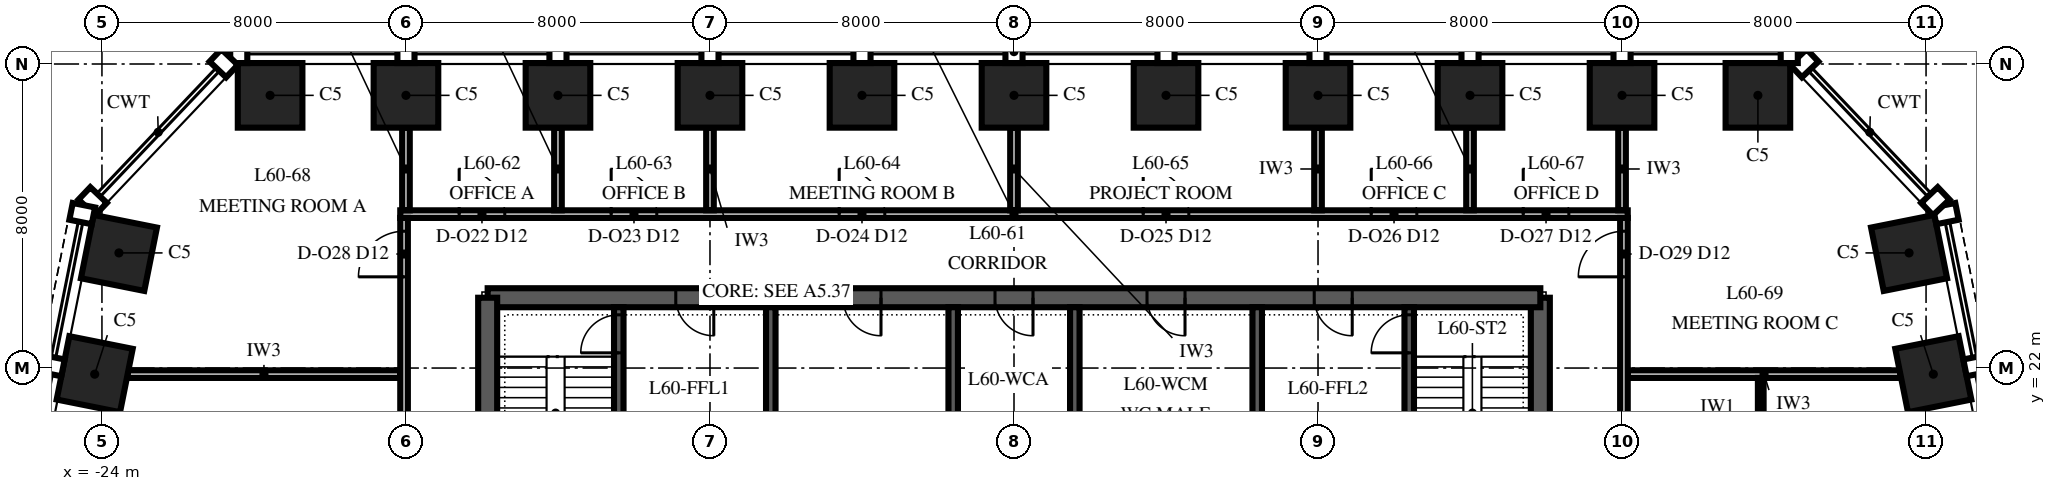
"""IFC4 building model, lengths in metres.
Left out: names, types, materials, properties, quantities, classifications, styles, units other than length and angle.
Written with IfcOpenShell. Run it as: python <this file> out.ifc"""

import sys

from ifc_helpers import new_model, si_unit, direction, frame, frame_2d, origin, origin_2d, place, context, subcontext, project, spatial, polyline, rectangle, outline, extrude, element, fill, save


model = new_model("IFC4")
c1 = context("Model", 3, precision=1e-05, world=origin(), true_north=direction((0.0, 1.0)))
c2 = subcontext(c1, "Body", "Model", "MODEL_VIEW")
j1 = project(units=[si_unit("LENGTHUNIT", "METRE"), si_unit("PLANEANGLEUNIT", "RADIAN")], contexts=[c1])
p1 = place(None, origin())
s1 = spatial("IfcSite", under=j1, at=p1, CompositionType="ELEMENT")
p2 = place(p1, origin())
s2 = spatial("IfcBuilding", under=s1, at=p2, CompositionType="ELEMENT")
p3 = place(p2, frame((0.0, 0.0, 260.0)))
s3 = spatial("IfcBuildingStorey", under=s2, at=p3, CompositionType="ELEMENT", Elevation=260.0)
for number, where, z_axis, x_axis in (
    (1, (24.191, 21.838, 0.0), (0.0, 0.0, 1.0), (-0.196, 0.981, 0.0)),
    (2, (23.553, 25.029, 0.0), (0.0, 0.0, 1.0), (-0.196, 0.981, 0.0)),
    (3, (19.575, 29.175, 0.0), (0.0, 0.0, 1.0), (-1.0, 0.0, 0.0)),
    (4, (16.0, 29.175, 0.0), (0.0, 0.0, 1.0), (-1.0, 0.0, 0.0)),
    (5, (12.0, 29.175, 0.0), (0.0, 0.0, 1.0), (-1.0, 0.0, 0.0)),
    (6, (8.0, 29.175, 0.0), (0.0, 0.0, 1.0), (-1.0, 0.0, 0.0)),
    (7, (4.0, 29.175, 0.0), (0.0, 0.0, 1.0), (-1.0, 0.0, 0.0)),
    (8, (0.0, 29.175, 0.0), (0.0, 0.0, 1.0), (-1.0, 0.0, 0.0)),
    (9, (-4.0, 29.175, 0.0), (0.0, 0.0, 1.0), (-1.0, 0.0, 0.0)),
    (10, (-8.0, 29.175, 0.0), (0.0, 0.0, 1.0), (-1.0, 0.0, 0.0)),
    (11, (-12.0, 29.175, 0.0), (0.0, 0.0, 1.0), (-1.0, 0.0, 0.0)),
    (12, (-16.0, 29.175, 0.0), (0.0, 0.0, 1.0), (-1.0, 0.0, 0.0)),
    (13, (-19.575, 29.175, 0.0), (0.0, 0.0, 1.0), (-1.0, 0.0, 0.0)),
    (14, (-23.553, 25.029, 0.0), (0.0, 0.0, 1.0), (-0.196, -0.981, 0.0)),
    (15, (-24.191, 21.838, 0.0), (0.0, 0.0, 1.0), (-0.196, -0.981, 0.0)),
):
    element("IfcColumn", number, at=place(p3, frame(where, z_axis=z_axis, x_axis=x_axis)), inside=s3, PredefinedType="COLUMN", context=c2, shape_type="SweptSolid", body=[
        extrude(rectangle(XDim=1.7, YDim=1.7, at=origin_2d()), origin(), (0.0, 0.0, 1.0), 4.0),
    ])
p4 = place(p3, frame((13.85, 6.15, 0.0), z_axis=(0.0, 0.0, 1.0), x_axis=(0.0, 1.0, 0.0)))
e16 = element("IfcWall", 16, at=p4, inside=s3, PredefinedType="SHEAR", context=c2, shape_type="SweptSolid", body=[
    extrude(outline(polyline([(0.0, -0.25), (17.7, -0.25), (17.7, 0.0), (17.45, 0.0), (17.45, 0.25), (0.25, 0.25), (0.25, 0.0), (0.0, 0.0), (0.0, -0.25)])), origin(), (0.0, 0.0, 1.0), 4.0),
])
p5 = place(p4, frame((4.15, 0.0, 0.0)))
e17 = element("IfcOpeningElement", 17, at=p5, cuts=e16, PredefinedType="OPENING", context=c2, shape_type="SweptSolid", body=[
    extrude(rectangle(XDim=1.8, YDim=2.4, at=frame_2d((0.9, 1.2))), frame((0.0, 0.265, 0.0), z_axis=(0.0, -1.0, 0.0), x_axis=(1.0, 0.0, 0.0)), (0.0, 0.0, 1.0), 0.53),
])
p6 = place(p3, frame((13.85, 23.85, 0.0), z_axis=(0.0, 0.0, 1.0), x_axis=(-1.0, 0.0, 0.0)))
e18 = element("IfcWall", 18, at=p6, inside=s3, PredefinedType="SHEAR", context=c2, shape_type="SweptSolid", body=[
    extrude(rectangle(XDim=27.7, YDim=0.5, at=frame_2d((13.85, 0.0))), origin(), (0.0, 0.0, 1.0), 4.0),
])
p7 = place(p6, frame((21.75, 0.0, 0.0)))
e19 = element("IfcOpeningElement", 19, at=p7, cuts=e18, PredefinedType="OPENING", context=c2, shape_type="SweptSolid", body=[
    extrude(rectangle(XDim=1.0, YDim=2.1, at=frame_2d((0.5, 1.05))), frame((0.0, 0.265, 0.0), z_axis=(0.0, -1.0, 0.0), x_axis=(1.0, 0.0, 0.0)), (0.0, 0.0, 1.0), 0.53),
])
p8 = place(p6, frame((4.95, 0.0, 0.0)))
e20 = element("IfcOpeningElement", 20, at=p8, cuts=e18, PredefinedType="OPENING", context=c2, shape_type="SweptSolid", body=[
    extrude(rectangle(XDim=1.0, YDim=2.1, at=frame_2d((0.5, 1.05))), frame((0.0, 0.265, 0.0), z_axis=(0.0, -1.0, 0.0), x_axis=(1.0, 0.0, 0.0)), (0.0, 0.0, 1.0), 0.53),
])
p9 = place(p6, frame((17.35, 0.0, 0.0)))
e21 = element("IfcOpeningElement", 21, at=p9, cuts=e18, PredefinedType="OPENING", context=c2, shape_type="SweptSolid", body=[
    extrude(rectangle(XDim=1.0, YDim=2.1, at=frame_2d((0.5, 1.05))), frame((0.0, 0.265, 0.0), z_axis=(0.0, -1.0, 0.0), x_axis=(1.0, 0.0, 0.0)), (0.0, 0.0, 1.0), 0.53),
])
p10 = place(p6, frame((13.35, 0.0, 0.0)))
e22 = element("IfcOpeningElement", 22, at=p10, cuts=e18, PredefinedType="OPENING", context=c2, shape_type="SweptSolid", body=[
    extrude(rectangle(XDim=1.0, YDim=2.1, at=frame_2d((0.5, 1.05))), frame((0.0, 0.265, 0.0), z_axis=(0.0, -1.0, 0.0), x_axis=(1.0, 0.0, 0.0)), (0.0, 0.0, 1.0), 0.53),
])
p11 = place(p6, frame((9.35, 0.0, 0.0)))
e23 = element("IfcOpeningElement", 23, at=p11, cuts=e18, PredefinedType="OPENING", context=c2, shape_type="SweptSolid", body=[
    extrude(rectangle(XDim=1.0, YDim=2.1, at=frame_2d((0.5, 1.05))), frame((0.0, 0.265, 0.0), z_axis=(0.0, -1.0, 0.0), x_axis=(1.0, 0.0, 0.0)), (0.0, 0.0, 1.0), 0.53),
])
p12 = place(p3, frame((-13.85, 23.85, 0.0), z_axis=(0.0, 0.0, 1.0), x_axis=(0.0, -1.0, 0.0)))
e24 = element("IfcWall", 24, at=p12, inside=s3, PredefinedType="SHEAR", context=c2, shape_type="SweptSolid", body=[
    extrude(outline(polyline([(0.0, -0.25), (17.7, -0.25), (17.7, 0.0), (17.45, 0.0), (17.45, 0.25), (0.25, 0.25), (0.25, 0.0), (0.0, 0.0), (0.0, -0.25)])), origin(), (0.0, 0.0, 1.0), 4.0),
])
p13 = place(p12, frame((11.75, 0.0, 0.0)))
e25 = element("IfcOpeningElement", 25, at=p13, cuts=e24, PredefinedType="OPENING", context=c2, shape_type="SweptSolid", body=[
    extrude(rectangle(XDim=1.8, YDim=2.4, at=frame_2d((0.9, 1.2))), frame((0.0, 0.265, 0.0), z_axis=(0.0, -1.0, 0.0), x_axis=(1.0, 0.0, 0.0)), (0.0, 0.0, 1.0), 0.53),
])
p14 = place(p3, frame((-10.4, 16.125, 0.0), z_axis=(0.0, 0.0, 1.0), x_axis=(0.0, 1.0, 0.0)))
e26 = element("IfcWall", 26, at=p14, inside=s3, PredefinedType="SHEAR", context=c2, shape_type="SweptSolid", body=[
    extrude(rectangle(XDim=7.475, YDim=0.25, at=frame_2d((3.738, 0.0))), origin(), (0.0, 0.0, 1.0), 4.0),
])
p15 = place(p14, frame((6.275, 0.0, 0.0)))
e27 = element("IfcOpeningElement", 27, at=p15, cuts=e26, PredefinedType="OPENING", context=c2, shape_type="SweptSolid", body=[
    extrude(rectangle(XDim=1.0, YDim=2.1, at=frame_2d((0.5, 1.05))), frame((0.0, 0.14, 0.0), z_axis=(0.0, -1.0, 0.0), x_axis=(1.0, 0.0, 0.0)), (0.0, 0.0, 1.0), 0.28),
])
for number, where, z_axis, x_axis in (
    (28, (-6.4, 16.125, 0.0), (0.0, 0.0, 1.0), (0.0, 1.0, 0.0)),
    (29, (-1.6, 16.125, 0.0), (0.0, 0.0, 1.0), (0.0, 1.0, 0.0)),
    (30, (1.6, 16.125, 0.0), (0.0, 0.0, 1.0), (0.0, 1.0, 0.0)),
    (31, (6.4, 16.125, 0.0), (0.0, 0.0, 1.0), (0.0, 1.0, 0.0)),
):
    element("IfcWall", number, at=place(p3, frame(where, z_axis=z_axis, x_axis=x_axis)), inside=s3, PredefinedType="SHEAR", context=c2, shape_type="SweptSolid", body=[
        extrude(rectangle(XDim=7.475, YDim=0.25, at=frame_2d((3.738, 0.0))), origin(), (0.0, 0.0, 1.0), 4.0),
    ])
p16 = place(p3, frame((10.4, 16.125, 0.0), z_axis=(0.0, 0.0, 1.0), x_axis=(0.0, 1.0, 0.0)))
e32 = element("IfcWall", 32, at=p16, inside=s3, PredefinedType="SHEAR", context=c2, shape_type="SweptSolid", body=[
    extrude(rectangle(XDim=7.475, YDim=0.25, at=frame_2d((3.738, 0.0))), origin(), (0.0, 0.0, 1.0), 4.0),
])
p17 = place(p16, frame((6.275, 0.0, 0.0)))
e33 = element("IfcOpeningElement", 33, at=p17, cuts=e32, PredefinedType="OPENING", context=c2, shape_type="SweptSolid", body=[
    extrude(rectangle(XDim=1.0, YDim=2.1, at=frame_2d((0.5, 1.05))), frame((0.0, 0.14, 0.0), z_axis=(0.0, -1.0, 0.0), x_axis=(1.0, 0.0, 0.0)), (0.0, 0.0, 1.0), 0.28),
])
for number, where, z_axis, x_axis in (
    (34, (-23.324, 21.84, 0.0), (0.0, 0.0, 1.0), (1.0, 0.0, 0.0)),
    (35, (16.15, 21.84, 0.0), (0.0, 0.0, 1.0), (1.0, 0.0, 0.0)),
):
    element("IfcWall", number, at=place(p3, frame(where, z_axis=z_axis, x_axis=x_axis)), inside=s3, PredefinedType="PARTITIONING", context=c2, shape_type="SweptSolid", body=[
        extrude(rectangle(XDim=7.174, YDim=0.2, at=frame_2d((3.587, 0.0))), origin(), (0.0, 0.0, 1.0), 3.23),
    ])
p18 = place(p3, frame((-16.15, 26.05, 0.0), z_axis=(0.0, 0.0, 1.0), x_axis=(1.0, 0.0, 0.0)))
e36 = element("IfcWall", 36, at=p18, inside=s3, PredefinedType="PARTITIONING", context=c2, shape_type="SweptSolid", body=[
    extrude(rectangle(XDim=32.3, YDim=0.2, at=frame_2d((16.15, 0.0))), origin(), (0.0, 0.0, 1.0), 3.418),
])
p19 = place(p18, frame((1.55, 0.0, 0.0)))
e37 = element("IfcOpeningElement", 37, at=p19, cuts=e36, PredefinedType="OPENING", context=c2, shape_type="SweptSolid", body=[
    extrude(rectangle(XDim=1.2, YDim=2.4, at=frame_2d((0.6, 1.2))), frame((0.0, 0.115, 0.0), z_axis=(0.0, -1.0, 0.0), x_axis=(1.0, 0.0, 0.0)), (0.0, 0.0, 1.0), 0.23),
])
p20 = place(p18, frame((5.55, 0.0, 0.0)))
e38 = element("IfcOpeningElement", 38, at=p20, cuts=e36, PredefinedType="OPENING", context=c2, shape_type="SweptSolid", body=[
    extrude(rectangle(XDim=1.2, YDim=2.4, at=frame_2d((0.6, 1.2))), frame((0.0, 0.115, 0.0), z_axis=(0.0, -1.0, 0.0), x_axis=(1.0, 0.0, 0.0)), (0.0, 0.0, 1.0), 0.23),
])
p21 = place(p18, frame((11.55, 0.0, 0.0)))
e39 = element("IfcOpeningElement", 39, at=p21, cuts=e36, PredefinedType="OPENING", context=c2, shape_type="SweptSolid", body=[
    extrude(rectangle(XDim=1.2, YDim=2.4, at=frame_2d((0.6, 1.2))), frame((0.0, 0.115, 0.0), z_axis=(0.0, -1.0, 0.0), x_axis=(1.0, 0.0, 0.0)), (0.0, 0.0, 1.0), 0.23),
])
p22 = place(p18, frame((19.55, 0.0, 0.0)))
e40 = element("IfcOpeningElement", 40, at=p22, cuts=e36, PredefinedType="OPENING", context=c2, shape_type="SweptSolid", body=[
    extrude(rectangle(XDim=1.2, YDim=2.4, at=frame_2d((0.6, 1.2))), frame((0.0, 0.115, 0.0), z_axis=(0.0, -1.0, 0.0), x_axis=(1.0, 0.0, 0.0)), (0.0, 0.0, 1.0), 0.23),
])
p23 = place(p18, frame((25.55, 0.0, 0.0)))
e41 = element("IfcOpeningElement", 41, at=p23, cuts=e36, PredefinedType="OPENING", context=c2, shape_type="SweptSolid", body=[
    extrude(rectangle(XDim=1.2, YDim=2.4, at=frame_2d((0.6, 1.2))), frame((0.0, 0.115, 0.0), z_axis=(0.0, -1.0, 0.0), x_axis=(1.0, 0.0, 0.0)), (0.0, 0.0, 1.0), 0.23),
])
p24 = place(p18, frame((29.55, 0.0, 0.0)))
e42 = element("IfcOpeningElement", 42, at=p24, cuts=e36, PredefinedType="OPENING", context=c2, shape_type="SweptSolid", body=[
    extrude(rectangle(XDim=1.2, YDim=2.4, at=frame_2d((0.6, 1.2))), frame((0.0, 0.115, 0.0), z_axis=(0.0, -1.0, 0.0), x_axis=(1.0, 0.0, 0.0)), (0.0, 0.0, 1.0), 0.23),
])
p25 = place(p3, frame((-16.05, 1.94, 0.0), z_axis=(0.0, 0.0, 1.0), x_axis=(0.0, 1.0, 0.0)))
e43 = element("IfcWall", 43, at=p25, inside=s3, PredefinedType="PARTITIONING", context=c2, shape_type="SweptSolid", body=[
    extrude(rectangle(XDim=24.01, YDim=0.2, at=frame_2d((12.005, 0.0))), origin(), (0.0, 0.0, 1.0), 2.842),
])
p26 = place(p25, frame((8.46, 0.0, 0.0)))
e44 = element("IfcOpeningElement", 44, at=p26, cuts=e43, PredefinedType="OPENING", context=c2, shape_type="SweptSolid", body=[
    extrude(rectangle(XDim=1.2, YDim=2.4, at=frame_2d((0.6, 1.2))), frame((0.0, 0.115, 0.0), z_axis=(0.0, -1.0, 0.0), x_axis=(1.0, 0.0, 0.0)), (0.0, 0.0, 1.0), 0.23),
])
p27 = place(p25, frame((22.46, 0.0, 0.0)))
e45 = element("IfcOpeningElement", 45, at=p27, cuts=e43, PredefinedType="OPENING", context=c2, shape_type="SweptSolid", body=[
    extrude(rectangle(XDim=1.2, YDim=2.4, at=frame_2d((0.6, 1.2))), frame((0.0, 0.115, 0.0), z_axis=(0.0, -1.0, 0.0), x_axis=(1.0, 0.0, 0.0)), (0.0, 0.0, 1.0), 0.23),
])
for number, where, z_axis, x_axis in (
    (46, (-16.0, 26.15, 0.0), (0.0, 0.0, 1.0), (0.0, 1.0, 0.0)),
    (47, (-12.0, 26.15, 0.0), (0.0, 0.0, 1.0), (0.0, 1.0, 0.0)),
    (48, (-8.0, 26.15, 0.0), (0.0, 0.0, 1.0), (0.0, 1.0, 0.0)),
    (49, (0.0, 26.15, 0.0), (0.0, 0.0, 1.0), (0.0, 1.0, 0.0)),
    (50, (8.0, 26.15, 0.0), (0.0, 0.0, 1.0), (0.0, 1.0, 0.0)),
    (51, (12.0, 26.15, 0.0), (0.0, 0.0, 1.0), (0.0, 1.0, 0.0)),
    (52, (16.0, 26.15, 0.0), (0.0, 0.0, 1.0), (0.0, 1.0, 0.0)),
):
    element("IfcWall", number, at=place(p3, frame(where, z_axis=z_axis, x_axis=x_axis)), inside=s3, PredefinedType="PARTITIONING", context=c2, shape_type="SweptSolid", body=[
        extrude(rectangle(XDim=2.175, YDim=0.2, at=frame_2d((1.087, 0.0))), origin(), (0.0, 0.0, 1.0), 3.418),
    ])
p28 = place(p3, frame((16.05, 1.94, 0.0), z_axis=(0.0, 0.0, 1.0), x_axis=(0.0, 1.0, 0.0)))
e53 = element("IfcWall", 53, at=p28, inside=s3, PredefinedType="PARTITIONING", context=c2, shape_type="SweptSolid", body=[
    extrude(rectangle(XDim=24.01, YDim=0.2, at=frame_2d((12.005, 0.0))), origin(), (0.0, 0.0, 1.0), 2.842),
])
p29 = place(p28, frame((8.46, 0.0, 0.0)))
e54 = element("IfcOpeningElement", 54, at=p29, cuts=e53, PredefinedType="OPENING", context=c2, shape_type="SweptSolid", body=[
    extrude(rectangle(XDim=1.2, YDim=2.4, at=frame_2d((0.6, 1.2))), frame((0.0, 0.115, 0.0), z_axis=(0.0, -1.0, 0.0), x_axis=(1.0, 0.0, 0.0)), (0.0, 0.0, 1.0), 0.23),
])
p30 = place(p28, frame((22.46, 0.0, 0.0)))
e55 = element("IfcOpeningElement", 55, at=p30, cuts=e53, PredefinedType="OPENING", context=c2, shape_type="SweptSolid", body=[
    extrude(rectangle(XDim=1.2, YDim=2.4, at=frame_2d((0.6, 1.2))), frame((0.0, 0.115, 0.0), z_axis=(0.0, -1.0, 0.0), x_axis=(1.0, 0.0, 0.0)), (0.0, 0.0, 1.0), 0.23),
])
p31 = place(p3, frame((19.65, 17.915, 0.0), z_axis=(0.0, 0.0, 1.0), x_axis=(0.0, 1.0, 0.0)))
e56 = element("IfcWall", 56, at=p31, inside=s3, PredefinedType="PARTITIONING", context=c2, shape_type="SweptSolid", body=[
    extrude(rectangle(XDim=3.825, YDim=0.15, at=frame_2d((1.913, 0.0))), origin(), (0.0, 0.0, 1.0), 3.23),
])
p32 = place(p31, frame((1.425, 0.0, 0.0)))
e57 = element("IfcOpeningElement", 57, at=p32, cuts=e56, PredefinedType="OPENING", context=c2, shape_type="SweptSolid", body=[
    extrude(rectangle(XDim=1.0, YDim=2.3, at=frame_2d((0.5, 1.15))), frame((0.0, 0.09, 0.0), z_axis=(0.0, -1.0, 0.0), x_axis=(1.0, 0.0, 0.0)), (0.0, 0.0, 1.0), 0.18),
])
p33 = place(p7, origin())
e58 = element("IfcDoor", 58, at=p33, inside=s3, OperationType="SINGLE_SWING_RIGHT", PredefinedType="DOOR", context=c2, shape_type="SweptSolid", body=[
    extrude(rectangle(XDim=1.0, YDim=2.1, at=frame_2d((0.5, 1.05))), frame((0.0, 0.25, 0.0), z_axis=(0.0, -1.0, 0.0), x_axis=(1.0, 0.0, 0.0)), (0.0, 0.0, 1.0), 0.5),
])
fill(e19, e58)
p34 = place(p8, origin())
e59 = element("IfcDoor", 59, at=p34, inside=s3, OperationType="SINGLE_SWING_RIGHT", PredefinedType="DOOR", context=c2, shape_type="SweptSolid", body=[
    extrude(rectangle(XDim=1.0, YDim=2.1, at=frame_2d((0.5, 1.05))), frame((0.0, 0.25, 0.0), z_axis=(0.0, -1.0, 0.0), x_axis=(1.0, 0.0, 0.0)), (0.0, 0.0, 1.0), 0.5),
])
fill(e20, e59)
p35 = place(p9, origin())
e60 = element("IfcDoor", 60, at=p35, inside=s3, OperationType="SINGLE_SWING_LEFT", PredefinedType="DOOR", context=c2, shape_type="SweptSolid", body=[
    extrude(rectangle(XDim=1.0, YDim=2.1, at=frame_2d((0.5, 1.05))), frame((0.0, 0.25, 0.0), z_axis=(0.0, -1.0, 0.0), x_axis=(1.0, 0.0, 0.0)), (0.0, 0.0, 1.0), 0.5),
])
fill(e21, e60)
p36 = place(p10, origin())
e61 = element("IfcDoor", 61, at=p36, inside=s3, OperationType="SINGLE_SWING_LEFT", PredefinedType="DOOR", context=c2, shape_type="SweptSolid", body=[
    extrude(rectangle(XDim=1.0, YDim=2.1, at=frame_2d((0.5, 1.05))), frame((0.0, 0.25, 0.0), z_axis=(0.0, -1.0, 0.0), x_axis=(1.0, 0.0, 0.0)), (0.0, 0.0, 1.0), 0.5),
])
fill(e22, e61)
p37 = place(p11, origin())
e62 = element("IfcDoor", 62, at=p37, inside=s3, OperationType="SINGLE_SWING_LEFT", PredefinedType="DOOR", context=c2, shape_type="SweptSolid", body=[
    extrude(rectangle(XDim=1.0, YDim=2.1, at=frame_2d((0.5, 1.05))), frame((0.0, 0.25, 0.0), z_axis=(0.0, -1.0, 0.0), x_axis=(1.0, 0.0, 0.0)), (0.0, 0.0, 1.0), 0.5),
])
fill(e23, e62)
p38 = place(p15, origin())
e63 = element("IfcDoor", 63, at=p38, inside=s3, OperationType="SINGLE_SWING_LEFT", PredefinedType="DOOR", context=c2, shape_type="SweptSolid", body=[
    extrude(rectangle(XDim=1.0, YDim=2.1, at=frame_2d((0.5, 1.05))), frame((0.0, 0.125, 0.0), z_axis=(0.0, -1.0, 0.0), x_axis=(1.0, 0.0, 0.0)), (0.0, 0.0, 1.0), 0.25),
])
fill(e27, e63)
p39 = place(p17, origin())
e64 = element("IfcDoor", 64, at=p39, inside=s3, OperationType="SINGLE_SWING_LEFT", PredefinedType="DOOR", context=c2, shape_type="SweptSolid", body=[
    extrude(rectangle(XDim=1.0, YDim=2.1, at=frame_2d((0.5, 1.05))), frame((0.0, 0.125, 0.0), z_axis=(0.0, -1.0, 0.0), x_axis=(1.0, 0.0, 0.0)), (0.0, 0.0, 1.0), 0.25),
])
fill(e33, e64)
p40 = place(p19, origin())
e65 = element("IfcDoor", 65, at=p40, inside=s3, OperationType="SINGLE_SWING_LEFT", PredefinedType="DOOR", context=c2, shape_type="SweptSolid", body=[
    extrude(rectangle(XDim=1.2, YDim=2.4, at=frame_2d((0.6, 1.2))), frame((0.0, 0.1, 0.0), z_axis=(0.0, -1.0, 0.0), x_axis=(1.0, 0.0, 0.0)), (0.0, 0.0, 1.0), 0.199),
])
fill(e37, e65)
p41 = place(p20, origin())
e66 = element("IfcDoor", 66, at=p41, inside=s3, OperationType="SINGLE_SWING_LEFT", PredefinedType="DOOR", context=c2, shape_type="SweptSolid", body=[
    extrude(rectangle(XDim=1.2, YDim=2.4, at=frame_2d((0.6, 1.2))), frame((0.0, 0.1, 0.0), z_axis=(0.0, -1.0, 0.0), x_axis=(1.0, 0.0, 0.0)), (0.0, 0.0, 1.0), 0.199),
])
fill(e38, e66)
p42 = place(p21, origin())
e67 = element("IfcDoor", 67, at=p42, inside=s3, OperationType="SINGLE_SWING_LEFT", PredefinedType="DOOR", context=c2, shape_type="SweptSolid", body=[
    extrude(rectangle(XDim=1.2, YDim=2.4, at=frame_2d((0.6, 1.2))), frame((0.0, 0.1, 0.0), z_axis=(0.0, -1.0, 0.0), x_axis=(1.0, 0.0, 0.0)), (0.0, 0.0, 1.0), 0.199),
])
fill(e39, e67)
p43 = place(p22, origin())
e68 = element("IfcDoor", 68, at=p43, inside=s3, OperationType="SINGLE_SWING_LEFT", PredefinedType="DOOR", context=c2, shape_type="SweptSolid", body=[
    extrude(rectangle(XDim=1.2, YDim=2.4, at=frame_2d((0.6, 1.2))), frame((0.0, 0.1, 0.0), z_axis=(0.0, -1.0, 0.0), x_axis=(1.0, 0.0, 0.0)), (0.0, 0.0, 1.0), 0.199),
])
fill(e40, e68)
p44 = place(p23, origin())
e69 = element("IfcDoor", 69, at=p44, inside=s3, OperationType="SINGLE_SWING_LEFT", PredefinedType="DOOR", context=c2, shape_type="SweptSolid", body=[
    extrude(rectangle(XDim=1.2, YDim=2.4, at=frame_2d((0.6, 1.2))), frame((0.0, 0.1, 0.0), z_axis=(0.0, -1.0, 0.0), x_axis=(1.0, 0.0, 0.0)), (0.0, 0.0, 1.0), 0.199),
])
fill(e41, e69)
p45 = place(p24, origin())
e70 = element("IfcDoor", 70, at=p45, inside=s3, OperationType="SINGLE_SWING_LEFT", PredefinedType="DOOR", context=c2, shape_type="SweptSolid", body=[
    extrude(rectangle(XDim=1.2, YDim=2.4, at=frame_2d((0.6, 1.2))), frame((0.0, 0.1, 0.0), z_axis=(0.0, -1.0, 0.0), x_axis=(1.0, 0.0, 0.0)), (0.0, 0.0, 1.0), 0.199),
])
fill(e42, e70)
p46 = place(p27, origin())
e71 = element("IfcDoor", 71, at=p46, inside=s3, OperationType="SINGLE_SWING_LEFT", PredefinedType="DOOR", context=c2, shape_type="SweptSolid", body=[
    extrude(rectangle(XDim=1.2, YDim=2.4, at=frame_2d((0.6, 1.2))), frame((0.0, 0.1, 0.0), z_axis=(0.0, -1.0, 0.0), x_axis=(1.0, 0.0, 0.0)), (0.0, 0.0, 1.0), 0.199),
])
fill(e45, e71)
p47 = place(p30, origin())
e72 = element("IfcDoor", 72, at=p47, inside=s3, OperationType="SINGLE_SWING_LEFT", PredefinedType="DOOR", context=c2, shape_type="SweptSolid", body=[
    extrude(rectangle(XDim=1.2, YDim=2.4, at=frame_2d((0.6, 1.2))), frame((0.0, 0.1, 0.0), z_axis=(0.0, -1.0, 0.0), x_axis=(1.0, 0.0, 0.0)), (0.0, 0.0, 1.0), 0.199),
])
fill(e55, e72)
save(model, sys.argv[1])
